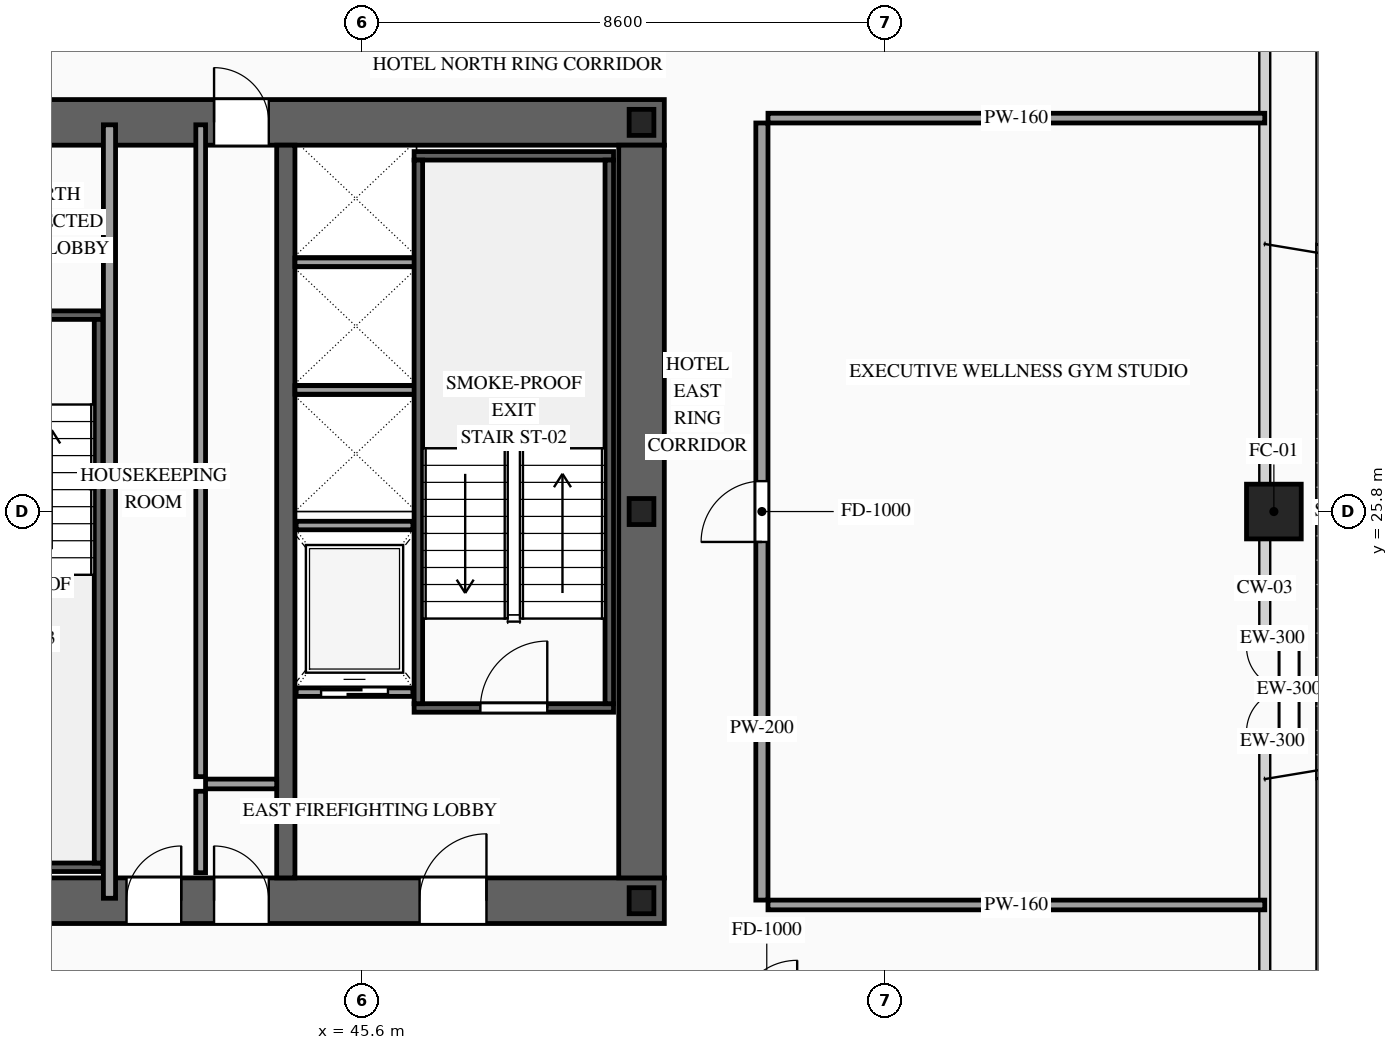
"""IFC4 building model, lengths in metres.
Left out: names, types, materials, properties, quantities, classifications, styles, units other than length and angle.
Written with IfcOpenShell. Run it as: python <this file> out.ifc"""

import sys

from ifc_helpers import new_model, si_unit, direction, frame, frame_2d, origin, origin_2d, place, context, subcontext, project, spatial, rectangle, hollow_rectangle, i_section, extrude, source, transform, mapped, element, fill, save


model = new_model("IFC4")
c1 = context("Model", 3, precision=1e-05, world=origin(), true_north=direction((0.0, 1.0)))
c2 = subcontext(c1, "Body", "Model", "MODEL_VIEW")
j1 = project(units=[si_unit("LENGTHUNIT", "METRE"), si_unit("PLANEANGLEUNIT", "RADIAN")], contexts=[c1])
p1 = place(None, origin())
s1 = spatial("IfcSite", under=j1, at=p1, CompositionType="ELEMENT")
p2 = place(p1, origin())
s2 = spatial("IfcBuilding", under=s1, at=p2, CompositionType="ELEMENT")
p3 = place(p2, frame((0.0, 0.0, 101.0)))
s3 = spatial("IfcBuildingStorey", under=s2, at=p3, CompositionType="ELEMENT", Elevation=101.0)
p4 = place(p3, frame((23.425, 19.4, 0.0), z_axis=(0.0, 0.0, 1.0), x_axis=(1.0, 0.0, 0.0)))
e1 = element("IfcWall", 1, at=p4, inside=s3, PredefinedType="SHEAR", context=c2, shape_type="SweptSolid", body=[
    extrude(rectangle(XDim=27.15, YDim=0.75, at=frame_2d((13.575, 0.0))), origin(), (0.0, 0.0, 1.0), 3.6),
])
p5 = place(p4, frame((2.025, 0.0, 0.0)))
e2 = element("IfcOpeningElement", 2, at=p5, cuts=e1, PredefinedType="OPENING", context=c2, shape_type="SweptSolid", body=[
    extrude(rectangle(XDim=1.1, YDim=2.2, at=frame_2d((0.55, 1.1))), frame((0.0, 0.39, 0.0), z_axis=(0.0, -1.0, 0.0), x_axis=(1.0, 0.0, 0.0)), (0.0, 0.0, 1.0), 0.78),
])
p6 = place(p4, frame((9.925, 0.0, 0.0)))
e3 = element("IfcOpeningElement", 3, at=p6, cuts=e1, PredefinedType="OPENING", context=c2, shape_type="SweptSolid", body=[
    extrude(rectangle(XDim=1.1, YDim=2.2, at=frame_2d((0.55, 1.1))), frame((0.0, 0.39, 0.0), z_axis=(0.0, -1.0, 0.0), x_axis=(1.0, 0.0, 0.0)), (0.0, 0.0, 1.0), 0.78),
])
p7 = place(p4, frame((23.125, 0.0, 0.0)))
e4 = element("IfcOpeningElement", 4, at=p7, cuts=e1, PredefinedType="OPENING", context=c2, shape_type="SweptSolid", body=[
    extrude(rectangle(XDim=1.1, YDim=2.2, at=frame_2d((0.55, 1.1))), frame((0.0, 0.39, 0.0), z_axis=(0.0, -1.0, 0.0), x_axis=(1.0, 0.0, 0.0)), (0.0, 0.0, 1.0), 0.78),
])
p8 = place(p4, frame((19.745, 0.0, 0.0)))
e5 = element("IfcOpeningElement", 5, at=p8, cuts=e1, PredefinedType="OPENING", context=c2, shape_type="SweptSolid", body=[
    extrude(rectangle(XDim=0.9, YDim=2.15, at=frame_2d((0.45, 1.075))), frame((0.0, 0.39, 0.0), z_axis=(0.0, -1.0, 0.0), x_axis=(1.0, 0.0, 0.0)), (0.0, 0.0, 1.0), 0.78),
])
p9 = place(p4, frame((18.305, 0.0, 0.0)))
e6 = element("IfcOpeningElement", 6, at=p9, cuts=e1, PredefinedType="OPENING", context=c2, shape_type="SweptSolid", body=[
    extrude(rectangle(XDim=0.9, YDim=2.15, at=frame_2d((0.45, 1.075))), frame((0.0, 0.39, 0.0), z_axis=(0.0, -1.0, 0.0), x_axis=(1.0, 0.0, 0.0)), (0.0, 0.0, 1.0), 0.78),
])
p10 = place(p3, frame((23.425, 32.2, 0.0), z_axis=(0.0, 0.0, 1.0), x_axis=(1.0, 0.0, 0.0)))
e7 = element("IfcWall", 7, at=p10, inside=s3, PredefinedType="SHEAR", context=c2, shape_type="SweptSolid", body=[
    extrude(rectangle(XDim=27.15, YDim=0.75, at=frame_2d((13.575, 0.0))), origin(), (0.0, 0.0, 1.0), 3.6),
])
p11 = place(p10, frame((4.645, 0.0, 0.0)))
e8 = element("IfcOpeningElement", 8, at=p11, cuts=e7, PredefinedType="OPENING", context=c2, shape_type="SweptSolid", body=[
    extrude(rectangle(XDim=0.9, YDim=2.15, at=frame_2d((0.45, 1.075))), frame((0.0, 0.39, 0.0), z_axis=(0.0, -1.0, 0.0), x_axis=(1.0, 0.0, 0.0)), (0.0, 0.0, 1.0), 0.78),
])
p12 = place(p10, frame((9.925, 0.0, 0.0)))
e9 = element("IfcOpeningElement", 9, at=p12, cuts=e7, PredefinedType="OPENING", context=c2, shape_type="SweptSolid", body=[
    extrude(rectangle(XDim=1.1, YDim=2.2, at=frame_2d((0.55, 1.1))), frame((0.0, 0.39, 0.0), z_axis=(0.0, -1.0, 0.0), x_axis=(1.0, 0.0, 0.0)), (0.0, 0.0, 1.0), 0.78),
])
p13 = place(p10, frame((15.775, 0.0, 0.0)))
e10 = element("IfcOpeningElement", 10, at=p13, cuts=e7, PredefinedType="OPENING", context=c2, shape_type="SweptSolid", body=[
    extrude(rectangle(XDim=1.1, YDim=2.2, at=frame_2d((0.55, 1.1))), frame((0.0, 0.39, 0.0), z_axis=(0.0, -1.0, 0.0), x_axis=(1.0, 0.0, 0.0)), (0.0, 0.0, 1.0), 0.78),
])
p14 = place(p10, frame((19.745, 0.0, 0.0)))
e11 = element("IfcOpeningElement", 11, at=p14, cuts=e7, PredefinedType="OPENING", context=c2, shape_type="SweptSolid", body=[
    extrude(rectangle(XDim=0.9, YDim=2.15, at=frame_2d((0.45, 1.075))), frame((0.0, 0.39, 0.0), z_axis=(0.0, -1.0, 0.0), x_axis=(1.0, 0.0, 0.0)), (0.0, 0.0, 1.0), 0.78),
])
m1 = source(origin(), c2, "Body", "SweptSolid", [
    extrude(rectangle(XDim=12.05, YDim=0.75, at=frame_2d((6.025, 0.0))), origin(), (0.0, 0.0, 1.0), 3.6),
])
p15 = place(p3, frame((50.2, 19.775, 0.0), z_axis=(0.0, 0.0, 1.0), x_axis=(0.0, 1.0, 0.0)))
e12 = element("IfcWall", 12, at=p15, inside=s3, PredefinedType="SHEAR", context=c2, shape_type="MappedRepresentation", body=[
    mapped(m1, transform((0.0, 0.0, 0.0), scale=1.0)),
])
m2 = source(origin(), c2, "Body", "SweptSolid", [
    extrude(rectangle(XDim=12.05, YDim=0.3, at=frame_2d((6.025, 0.0))), origin(), (0.0, 0.0, 1.0), 3.6),
])
p16 = place(p3, frame((44.35, 19.775, 0.0), z_axis=(0.0, 0.0, 1.0), x_axis=(0.0, 1.0, 0.0)))
e13 = element("IfcWall", 13, at=p16, inside=s3, PredefinedType="SOLIDWALL", context=c2, shape_type="MappedRepresentation", body=[
    mapped(m2, transform((0.0, 0.0, 0.0), scale=1.0)),
])
m3 = source(origin(), c2, "Body", "SweptSolid", [
    extrude(i_section(OverallWidth=0.407, OverallDepth=0.428, WebThickness=0.02, FlangeThickness=0.035, at=origin_2d()), origin(), (0.0, 0.0, 1.0), 3.6),
])
for number, where, z_axis, x_axis in (
    (14, (50.2, 19.4, 0.0), (0.0, 0.0, 1.0), (1.0, 0.0, 0.0)),
    (15, (50.2, 25.8, 0.0), (0.0, 0.0, 1.0), (1.0, 0.0, 0.0)),
    (16, (50.2, 32.2, 0.0), (0.0, 0.0, 1.0), (1.0, 0.0, 0.0)),
):
    element("IfcColumn", number, at=place(p3, frame(where, z_axis=z_axis, x_axis=x_axis)), inside=s3, PredefinedType="COLUMN", context=c2, shape_type="MappedRepresentation", body=[
        mapped(m3, transform((0.0, 0.0, 0.0), scale=1.0)),
    ])
m4 = source(origin(), c2, "Body", "SweptSolid", [
    extrude(hollow_rectangle(XDim=0.9, YDim=0.9, WallThickness=0.042, at=origin_2d()), origin(), (0.0, 0.0, 1.0), 3.6),
])
p17 = place(p3, frame((60.6, 25.8, 0.0), z_axis=(0.0, 0.0, 1.0), x_axis=(1.0, 0.0, 0.0)))
e17 = element("IfcColumn", 17, at=p17, inside=s3, PredefinedType="COLUMN", context=c2, shape_type="MappedRepresentation", body=[
    mapped(m4, transform((0.0, 0.0, 0.0), scale=1.0)),
])
p18 = place(p3, frame((60.85, 21.875, 0.0), z_axis=(0.0, 0.0, 1.0), x_axis=(0.0, 1.0, 0.0)))
e18 = element("IfcWall", 18, at=p18, inside=s3, PredefinedType="SOLIDWALL", context=c2, shape_type="SweptSolid", body=[
    extrude(rectangle(XDim=2.0, YDim=0.3, at=frame_2d((1.0, 0.0))), origin(), (0.0, 0.0, 1.0), 3.38),
])
p19 = place(p18, frame((0.3, 0.0, 0.0)))
e19 = element("IfcOpeningElement", 19, at=p19, cuts=e18, PredefinedType="OPENING", context=c2, shape_type="SweptSolid", body=[
    extrude(rectangle(XDim=1.4, YDim=2.3, at=frame_2d((0.7, 1.15))), frame((0.0, 0.165, 0.0), z_axis=(0.0, -1.0, 0.0), x_axis=(1.0, 0.0, 0.0)), (0.0, 0.0, 1.0), 0.33),
])
m5 = source(origin(), c2, "Body", "SweptSolid", [
    extrude(rectangle(XDim=0.25, YDim=0.3, at=frame_2d((0.125, 0.0))), origin(), (0.0, 0.0, 1.0), 3.38),
])
for number, where, z_axis, x_axis in (
    (20, (60.45, 22.025, 0.0), (0.0, 0.0, 1.0), (1.0, 0.0, 0.0)),
    (21, (60.7, 23.725, 0.0), (0.0, 0.0, 1.0), (-1.0, 0.0, 0.0)),
):
    element("IfcWall", number, at=place(p3, frame(where, z_axis=z_axis, x_axis=x_axis)), inside=s3, PredefinedType="SOLIDWALL", context=c2, shape_type="MappedRepresentation", body=[
        mapped(m5, transform((0.0, 0.0, 0.0), scale=1.0)),
    ])
p20 = place(p3, frame((44.52, 22.83, 0.0), z_axis=(0.0, 0.0, 1.0), x_axis=(1.0, 0.0, 0.0)))
e22 = element("IfcWall", 22, at=p20, inside=s3, PredefinedType="SOLIDWALL", context=c2, shape_type="SweptSolid", body=[
    extrude(rectangle(XDim=1.92, YDim=0.14, at=frame_2d((0.96, 0.0))), origin(), (0.0, 0.0, 1.0), 3.38),
])
p21 = place(p20, frame((0.41, 0.0, 0.0)))
e23 = element("IfcOpeningElement", 23, at=p21, cuts=e22, PredefinedType="OPENING", context=c2, shape_type="SweptSolid", body=[
    extrude(rectangle(XDim=1.1, YDim=2.2, at=frame_2d((0.55, 1.1))), frame((0.0, 0.085, 0.0), z_axis=(0.0, -1.0, 0.0), x_axis=(1.0, 0.0, 0.0)), (0.0, 0.0, 1.0), 0.17),
])
m6 = source(origin(), c2, "Body", "SweptSolid", [
    extrude(rectangle(XDim=1.92, YDim=0.14, at=frame_2d((0.96, 0.0))), origin(), (0.0, 0.0, 1.0), 3.38),
])
p22 = place(p3, frame((44.52, 25.57, 0.0), z_axis=(0.0, 0.0, 1.0), x_axis=(1.0, 0.0, 0.0)))
e24 = element("IfcWall", 24, at=p22, inside=s3, PredefinedType="SOLIDWALL", context=c2, shape_type="MappedRepresentation", body=[
    mapped(m6, transform((0.0, 0.0, 0.0), scale=1.0)),
])
m7 = source(origin(), c2, "Body", "SweptSolid", [
    extrude(rectangle(XDim=2.0, YDim=0.14, at=frame_2d((1.0, 0.0))), origin(), (0.0, 0.0, 1.0), 3.38),
])
for number, where, z_axis, x_axis in (
    (25, (44.5, 27.8, 0.0), (0.0, 0.0, 1.0), (1.0, 0.0, 0.0)),
    (26, (44.5, 29.9, 0.0), (0.0, 0.0, 1.0), (1.0, 0.0, 0.0)),
):
    element("IfcWall", number, at=place(p3, frame(where, z_axis=z_axis, x_axis=x_axis)), inside=s3, PredefinedType="SOLIDWALL", context=c2, shape_type="MappedRepresentation", body=[
        mapped(m7, transform((0.0, 0.0, 0.0), scale=1.0)),
    ])
p23 = place(p3, frame((46.46, 22.57, 0.0), z_axis=(0.0, 0.0, 1.0), x_axis=(1.0, 0.0, 0.0)))
e27 = element("IfcWall", 27, at=p23, inside=s3, PredefinedType="SOLIDWALL", context=c2, shape_type="SweptSolid", body=[
    extrude(rectangle(XDim=3.28, YDim=0.14, at=frame_2d((1.64, 0.0))), origin(), (0.0, 0.0, 1.0), 3.38),
])
p24 = place(p23, frame((1.09, 0.0, 0.0)))
e28 = element("IfcOpeningElement", 28, at=p24, cuts=e27, PredefinedType="OPENING", context=c2, shape_type="SweptSolid", body=[
    extrude(rectangle(XDim=1.1, YDim=2.2, at=frame_2d((0.55, 1.1))), frame((0.0, 0.085, 0.0), z_axis=(0.0, -1.0, 0.0), x_axis=(1.0, 0.0, 0.0)), (0.0, 0.0, 1.0), 0.17),
])
m8 = source(origin(), c2, "Body", "SweptSolid", [
    extrude(rectangle(XDim=3.28, YDim=0.14, at=frame_2d((1.64, 0.0))), origin(), (0.0, 0.0, 1.0), 3.38),
])
p25 = place(p3, frame((46.46, 31.65, 0.0), z_axis=(0.0, 0.0, 1.0), x_axis=(1.0, 0.0, 0.0)))
e29 = element("IfcWall", 29, at=p25, inside=s3, PredefinedType="SOLIDWALL", context=c2, shape_type="MappedRepresentation", body=[
    mapped(m8, transform((0.0, 0.0, 0.0), scale=1.0)),
])
m9 = source(origin(), c2, "Body", "SweptSolid", [
    extrude(rectangle(XDim=8.94, YDim=0.14, at=frame_2d((4.47, 0.0))), origin(), (0.0, 0.0, 1.0), 3.38),
])
for number, where, z_axis, x_axis in (
    (30, (46.53, 22.64, 0.0), (0.0, 0.0, 1.0), (0.0, 1.0, 0.0)),
    (31, (49.67, 22.64, 0.0), (0.0, 0.0, 1.0), (0.0, 1.0, 0.0)),
):
    element("IfcWall", number, at=place(p3, frame(where, z_axis=z_axis, x_axis=x_axis)), inside=s3, PredefinedType="SOLIDWALL", context=c2, shape_type="MappedRepresentation", body=[
        mapped(m9, transform((0.0, 0.0, 0.0), scale=1.0)),
    ])
p26 = place(p3, frame((38.2, 29.03, 0.0), z_axis=(0.0, 0.0, 1.0), x_axis=(1.0, 0.0, 0.0)))
e32 = element("IfcWall", 32, at=p26, inside=s3, PredefinedType="SOLIDWALL", context=c2, shape_type="SweptSolid", body=[
    extrude(rectangle(XDim=3.14, YDim=0.14, at=frame_2d((1.57, 0.0))), origin(), (0.0, 0.0, 1.0), 3.38),
])
p27 = place(p26, frame((1.02, 0.0, 0.0)))
e33 = element("IfcOpeningElement", 33, at=p27, cuts=e32, PredefinedType="OPENING", context=c2, shape_type="SweptSolid", body=[
    extrude(rectangle(XDim=1.1, YDim=2.2, at=frame_2d((0.55, 1.1))), frame((0.0, 0.085, 0.0), z_axis=(0.0, -1.0, 0.0), x_axis=(1.0, 0.0, 0.0)), (0.0, 0.0, 1.0), 0.17),
])
m10 = source(origin(), c2, "Body", "SweptSolid", [
    extrude(rectangle(XDim=3.14, YDim=0.14, at=frame_2d((1.57, 0.0))), origin(), (0.0, 0.0, 1.0), 3.38),
])
p28 = place(p3, frame((38.2, 19.95, 0.0), z_axis=(0.0, 0.0, 1.0), x_axis=(1.0, 0.0, 0.0)))
e34 = element("IfcWall", 34, at=p28, inside=s3, PredefinedType="SOLIDWALL", context=c2, shape_type="MappedRepresentation", body=[
    mapped(m10, transform((0.0, 0.0, 0.0), scale=1.0)),
])
m11 = source(origin(), c2, "Body", "SweptSolid", [
    extrude(rectangle(XDim=8.94, YDim=0.14, at=frame_2d((4.47, 0.0))), origin(), (0.0, 0.0, 1.0), 3.38),
])
p29 = place(p3, frame((41.27, 20.02, 0.0), z_axis=(0.0, 0.0, 1.0), x_axis=(0.0, 1.0, 0.0)))
e35 = element("IfcWall", 35, at=p29, inside=s3, PredefinedType="SOLIDWALL", context=c2, shape_type="MappedRepresentation", body=[
    mapped(m11, transform((0.0, 0.0, 0.0), scale=1.0)),
])
m12 = source(origin(), c2, "Body", "SweptSolid", [
    extrude(rectangle(XDim=1.34, YDim=0.16, at=frame_2d((0.67, 0.0))), origin(), (0.0, 0.0, 1.0), 3.38),
])
p30 = place(p3, frame((42.95, 19.86, 0.0), z_axis=(0.0, 0.0, 1.0), x_axis=(0.0, 1.0, 0.0)))
e36 = element("IfcWall", 36, at=p30, inside=s3, PredefinedType="PARTITIONING", context=c2, shape_type="MappedRepresentation", body=[
    mapped(m12, transform((0.0, 0.0, 0.0), scale=1.0)),
])
m13 = source(origin(), c2, "Body", "SweptSolid", [
    extrude(rectangle(XDim=1.17, YDim=0.16, at=frame_2d((0.585, 0.0))), origin(), (0.0, 0.0, 1.0), 3.38),
])
p31 = place(p3, frame((43.03, 21.32, 0.0), z_axis=(0.0, 0.0, 1.0), x_axis=(1.0, 0.0, 0.0)))
e37 = element("IfcWall", 37, at=p31, inside=s3, PredefinedType="PARTITIONING", context=c2, shape_type="MappedRepresentation", body=[
    mapped(m13, transform((0.0, 0.0, 0.0), scale=1.0)),
])
m14 = source(origin(), c2, "Body", "SweptSolid", [
    extrude(rectangle(XDim=12.72, YDim=0.2, at=frame_2d((6.36, 0.0))), origin(), (0.0, 0.0, 1.0), 3.38),
])
p32 = place(p3, frame((41.45, 19.44, 0.0), z_axis=(0.0, 0.0, 1.0), x_axis=(0.0, 1.0, 0.0)))
e38 = element("IfcWall", 38, at=p32, inside=s3, PredefinedType="PARTITIONING", context=c2, shape_type="MappedRepresentation", body=[
    mapped(m14, transform((0.0, 0.0, 0.0), scale=1.0)),
])
m15 = source(origin(), c2, "Body", "SweptSolid", [
    extrude(rectangle(XDim=10.72, YDim=0.16, at=frame_2d((5.36, 0.0))), origin(), (0.0, 0.0, 1.0), 3.38),
])
p33 = place(p3, frame((42.95, 21.44, 0.0), z_axis=(0.0, 0.0, 1.0), x_axis=(0.0, 1.0, 0.0)))
e39 = element("IfcWall", 39, at=p33, inside=s3, PredefinedType="PARTITIONING", context=c2, shape_type="MappedRepresentation", body=[
    mapped(m15, transform((0.0, 0.0, 0.0), scale=1.0)),
])
p34 = place(p3, frame((52.18, 19.41, 0.0), z_axis=(0.0, 0.0, 1.0), x_axis=(0.0, 1.0, 0.0)))
e40 = element("IfcWall", 40, at=p34, inside=s3, PredefinedType="PARTITIONING", context=c2, shape_type="SweptSolid", body=[
    extrude(rectangle(XDim=12.78, YDim=0.2, at=frame_2d((6.39, 0.0))), origin(), (0.0, 0.0, 1.0), 3.38),
])
p35 = place(p34, frame((5.89, 0.0, 0.0)))
e41 = element("IfcOpeningElement", 41, at=p35, cuts=e40, PredefinedType="OPENING", context=c2, shape_type="SweptSolid", body=[
    extrude(rectangle(XDim=1.0, YDim=2.2, at=frame_2d((0.5, 1.1))), frame((0.0, 0.115, 0.0), z_axis=(0.0, -1.0, 0.0), x_axis=(1.0, 0.0, 0.0)), (0.0, 0.0, 1.0), 0.23),
])
m16 = source(origin(), c2, "Body", "SweptSolid", [
    extrude(rectangle(XDim=8.17, YDim=0.16, at=frame_2d((4.085, 0.0))), origin(), (0.0, 0.0, 1.0), 2.875),
])
for number, where, z_axis, x_axis in (
    (42, (52.28, 19.33, 0.0), (0.0, 0.0, 1.0), (1.0, 0.0, 0.0)),
    (43, (52.28, 32.27, 0.0), (0.0, 0.0, 1.0), (1.0, 0.0, 0.0)),
):
    element("IfcWall", number, at=place(p3, frame(where, z_axis=z_axis, x_axis=x_axis)), inside=s3, PredefinedType="PARTITIONING", context=c2, shape_type="MappedRepresentation", body=[
        mapped(m16, transform((0.0, 0.0, 0.0), scale=1.0)),
    ])
m17 = source(origin(), c2, "Body", "SweptSolid", [
    extrude(rectangle(XDim=1.4, YDim=2.3, at=frame_2d((0.7, 1.15))), frame((0.0, 0.025, 0.0), z_axis=(0.0, -1.0, 0.0), x_axis=(1.0, 0.0, 0.0)), (0.0, 0.0, 1.0), 0.05),
])
p36 = place(p19, origin())
e44 = element("IfcDoor", 44, at=p36, inside=s3, OperationType="DOUBLE_DOOR_SINGLE_SWING", PredefinedType="DOOR", context=c2, shape_type="MappedRepresentation", body=[
    mapped(m17, transform((0.0, 0.0, 0.0), scale=1.0)),
])
fill(e19, e44)
m18 = source(origin(), c2, "Body", "SweptSolid", [
    extrude(rectangle(XDim=1.1, YDim=2.2, at=frame_2d((0.55, 1.1))), frame((0.0, 0.025, 0.0), z_axis=(0.0, -1.0, 0.0), x_axis=(1.0, 0.0, 0.0)), (0.0, 0.0, 1.0), 0.05),
])
p37 = place(p21, origin())
e45 = element("IfcDoor", 45, at=p37, inside=s3, OperationType="SLIDING_TO_RIGHT", PredefinedType="DOOR", context=c2, shape_type="MappedRepresentation", body=[
    mapped(m18, transform((0.0, 0.0, 0.0), scale=1.0)),
])
fill(e23, e45)
m19 = source(origin(), c2, "Body", "SweptSolid", [
    extrude(rectangle(XDim=1.1, YDim=2.2, at=frame_2d((0.55, 1.1))), frame((0.0, 0.025, 0.0), z_axis=(0.0, -1.0, 0.0), x_axis=(1.0, 0.0, 0.0)), (0.0, 0.0, 1.0), 0.05),
])
p38 = place(p24, origin())
e46 = element("IfcDoor", 46, at=p38, inside=s3, OperationType="SINGLE_SWING_RIGHT", PredefinedType="DOOR", context=c2, shape_type="MappedRepresentation", body=[
    mapped(m19, transform((0.0, 0.0, 0.0), scale=1.0)),
])
fill(e28, e46)
p39 = place(p7, origin())
e47 = element("IfcDoor", 47, at=p39, inside=s3, OperationType="SINGLE_SWING_RIGHT", PredefinedType="DOOR", context=c2, shape_type="MappedRepresentation", body=[
    mapped(m19, transform((0.0, 0.0, 0.0), scale=1.0)),
])
fill(e4, e47)
m20 = source(origin(), c2, "Body", "SweptSolid", [
    extrude(rectangle(XDim=0.9, YDim=2.15, at=frame_2d((0.45, 1.075))), frame((0.0, 0.025, 0.0), z_axis=(0.0, -1.0, 0.0), x_axis=(1.0, 0.0, 0.0)), (0.0, 0.0, 1.0), 0.05),
])
p40 = place(p8, origin())
e48 = element("IfcDoor", 48, at=p40, inside=s3, OperationType="SINGLE_SWING_LEFT", PredefinedType="DOOR", context=c2, shape_type="MappedRepresentation", body=[
    mapped(m20, transform((0.0, 0.0, 0.0), scale=1.0)),
])
fill(e5, e48)
p41 = place(p9, origin())
e49 = element("IfcDoor", 49, at=p41, inside=s3, OperationType="SINGLE_SWING_RIGHT", PredefinedType="DOOR", context=c2, shape_type="MappedRepresentation", body=[
    mapped(m20, transform((0.0, 0.0, 0.0), scale=1.0)),
])
fill(e6, e49)
p42 = place(p14, origin())
e50 = element("IfcDoor", 50, at=p42, inside=s3, OperationType="SINGLE_SWING_LEFT", PredefinedType="DOOR", context=c2, shape_type="MappedRepresentation", body=[
    mapped(m20, transform((0.0, 0.0, 0.0), scale=1.0)),
])
fill(e11, e50)
m21 = source(origin(), c2, "Body", "SweptSolid", [
    extrude(rectangle(XDim=1.0, YDim=2.2, at=frame_2d((0.5, 1.1))), frame((0.0, 0.025, 0.0), z_axis=(0.0, -1.0, 0.0), x_axis=(1.0, 0.0, 0.0)), (0.0, 0.0, 1.0), 0.05),
])
p43 = place(p35, origin())
e51 = element("IfcDoor", 51, at=p43, inside=s3, OperationType="SINGLE_SWING_LEFT", PredefinedType="DOOR", context=c2, shape_type="MappedRepresentation", body=[
    mapped(m21, transform((0.0, 0.0, 0.0), scale=1.0)),
])
fill(e41, e51)
save(model, sys.argv[1])
